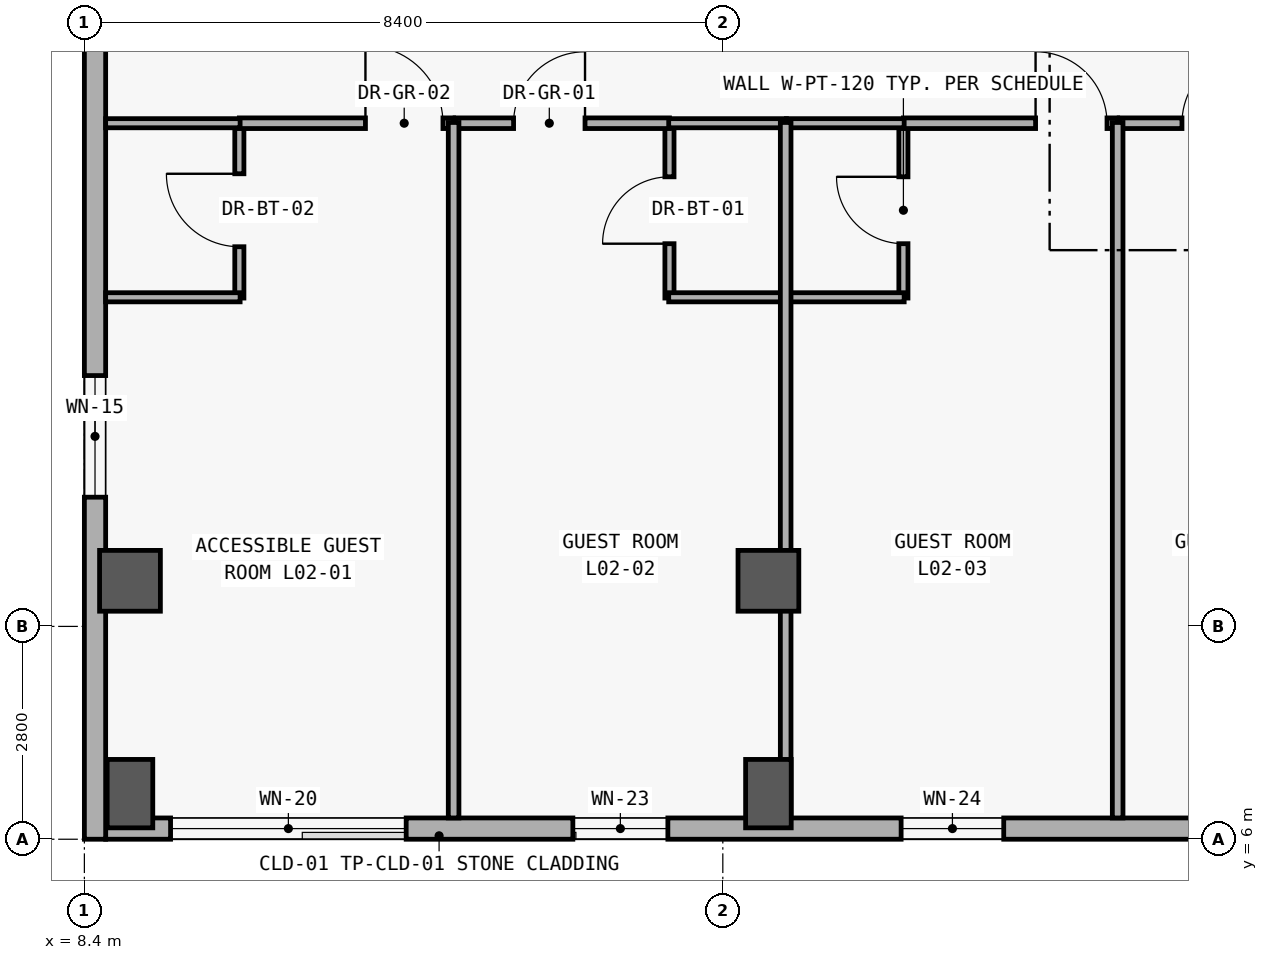
"""IFC4 building model, lengths in metres.
Left out: names, types, materials, properties, quantities, classifications, styles, units other than length and angle.
Written with IfcOpenShell. Run it as: python <this file> out.ifc"""

import sys

from ifc_helpers import new_model, si_unit, direction, frame, frame_2d, origin, origin_2d, place, context, subcontext, project, spatial, rectangle, extrude, element, fill, save


model = new_model("IFC4")
c1 = context("Model", 3, precision=1e-05, world=origin(), true_north=direction((0.0, 1.0)))
c2 = subcontext(c1, "Body", "Model", "MODEL_VIEW")
j1 = project(units=[si_unit("LENGTHUNIT", "METRE"), si_unit("PLANEANGLEUNIT", "RADIAN")], contexts=[c1])
p1 = place(None, origin())
s1 = spatial("IfcSite", under=j1, at=p1, CompositionType="ELEMENT")
p2 = place(p1, origin())
s2 = spatial("IfcBuilding", under=s1, at=p2, CompositionType="ELEMENT")
p3 = place(p2, frame((0.0, 0.0, 10.8)))
s3 = spatial("IfcBuildingStorey", under=s2, at=p3, CompositionType="ELEMENT", Elevation=10.8)
p4 = place(p3, frame((9.0, 6.6, 0.0), z_axis=(0.0, 0.0, 1.0), x_axis=(0.0, 1.0, 0.0)))
e1 = element("IfcColumn", 1, at=p4, inside=s3, PredefinedType="COLUMN", context=c2, shape_type="SweptSolid", body=[
    extrude(rectangle(XDim=0.6, YDim=0.9, at=origin_2d()), origin(), (0.0, 0.0, 1.0), 4.2),
])
p5 = place(p3, frame((9.0, 9.4, 0.0), z_axis=(0.0, 0.0, 1.0), x_axis=(1.0, 0.0, 0.0)))
e2 = element("IfcColumn", 2, at=p5, inside=s3, PredefinedType="COLUMN", context=c2, shape_type="SweptSolid", body=[
    extrude(rectangle(XDim=0.8, YDim=0.8, at=origin_2d()), origin(), (0.0, 0.0, 1.0), 4.2),
])
p6 = place(p3, frame((17.4, 6.6, 0.0), z_axis=(0.0, 0.0, 1.0), x_axis=(0.0, 1.0, 0.0)))
e3 = element("IfcColumn", 3, at=p6, inside=s3, PredefinedType="COLUMN", context=c2, shape_type="SweptSolid", body=[
    extrude(rectangle(XDim=0.6, YDim=0.9, at=origin_2d()), origin(), (0.0, 0.0, 1.0), 4.2),
])
p7 = place(p3, frame((17.4, 9.4, 0.0), z_axis=(0.0, 0.0, 1.0), x_axis=(1.0, 0.0, 0.0)))
e4 = element("IfcColumn", 4, at=p7, inside=s3, PredefinedType="COLUMN", context=c2, shape_type="SweptSolid", body=[
    extrude(rectangle(XDim=0.8, YDim=0.8, at=origin_2d()), origin(), (0.0, 0.0, 1.0), 4.2),
])
p8 = place(p3, frame((92.12, 6.14, 0.0), z_axis=(0.0, 0.0, 1.0), x_axis=(-1.0, 0.0, 0.0)))
e5 = element("IfcWall", 5, at=p8, inside=s3, PredefinedType="SOLIDWALL", context=c2, shape_type="SweptSolid", body=[
    extrude(rectangle(XDim=83.44, YDim=0.28, at=frame_2d((41.72, 0.0))), origin(), (0.0, 0.0, 1.0), 3.92),
])
p9 = place(p8, frame((79.486, 0.0, 0.85)))
e6 = element("IfcOpeningElement", 6, at=p9, cuts=e5, PredefinedType="OPENING", context=c2, shape_type="SweptSolid", body=[
    extrude(rectangle(XDim=3.1, YDim=2.2, at=frame_2d((1.55, 1.1))), frame((0.0, 0.15, 0.0), z_axis=(0.0, -1.0, 0.0), x_axis=(1.0, 0.0, 0.0)), (0.0, 0.0, 1.0), 0.3),
])
p10 = place(p8, frame((76.043, 0.0, 0.85)))
e7 = element("IfcOpeningElement", 7, at=p10, cuts=e5, PredefinedType="OPENING", context=c2, shape_type="SweptSolid", body=[
    extrude(rectangle(XDim=1.25, YDim=1.45, at=frame_2d((0.625, 0.725))), frame((0.0, 0.15, 0.0), z_axis=(0.0, -1.0, 0.0), x_axis=(1.0, 0.0, 0.0)), (0.0, 0.0, 1.0), 0.3),
])
p11 = place(p8, frame((71.624, 0.0, 0.85)))
e8 = element("IfcOpeningElement", 8, at=p11, cuts=e5, PredefinedType="OPENING", context=c2, shape_type="SweptSolid", body=[
    extrude(rectangle(XDim=1.35, YDim=1.55, at=frame_2d((0.675, 0.775))), frame((0.0, 0.15, 0.0), z_axis=(0.0, -1.0, 0.0), x_axis=(1.0, 0.0, 0.0)), (0.0, 0.0, 1.0), 0.3),
])
p12 = place(p8, frame((67.206, 0.0, 0.85)))
e9 = element("IfcOpeningElement", 9, at=p12, cuts=e5, PredefinedType="OPENING", context=c2, shape_type="SweptSolid", body=[
    extrude(rectangle(XDim=1.45, YDim=1.65, at=frame_2d((0.725, 0.825))), frame((0.0, 0.15, 0.0), z_axis=(0.0, -1.0, 0.0), x_axis=(1.0, 0.0, 0.0)), (0.0, 0.0, 1.0), 0.3),
])
p13 = place(p8, frame((62.787, 0.0, 0.85)))
e10 = element("IfcOpeningElement", 10, at=p13, cuts=e5, PredefinedType="OPENING", context=c2, shape_type="SweptSolid", body=[
    extrude(rectangle(XDim=1.55, YDim=1.65, at=frame_2d((0.775, 0.825))), frame((0.0, 0.15, 0.0), z_axis=(0.0, -1.0, 0.0), x_axis=(1.0, 0.0, 0.0)), (0.0, 0.0, 1.0), 0.3),
])
p14 = place(p8, frame((58.344, 0.0, 0.85)))
e11 = element("IfcOpeningElement", 11, at=p14, cuts=e5, PredefinedType="OPENING", context=c2, shape_type="SweptSolid", body=[
    extrude(rectangle(XDim=1.7, YDim=2.0, at=frame_2d((0.85, 1.0))), frame((0.0, 0.15, 0.0), z_axis=(0.0, -1.0, 0.0), x_axis=(1.0, 0.0, 0.0)), (0.0, 0.0, 1.0), 0.3),
])
p15 = place(p8, frame((53.675, 0.0, 0.85)))
e12 = element("IfcOpeningElement", 12, at=p15, cuts=e5, PredefinedType="OPENING", context=c2, shape_type="SweptSolid", body=[
    extrude(rectangle(XDim=2.3, YDim=2.05, at=frame_2d((1.15, 1.025))), frame((0.0, 0.15, 0.0), z_axis=(0.0, -1.0, 0.0), x_axis=(1.0, 0.0, 0.0)), (0.0, 0.0, 1.0), 0.3),
])
p16 = place(p8, frame((49.082, 0.0, 0.85)))
e13 = element("IfcOpeningElement", 13, at=p16, cuts=e5, PredefinedType="OPENING", context=c2, shape_type="SweptSolid", body=[
    extrude(rectangle(XDim=2.75, YDim=2.1, at=frame_2d((1.375, 1.05))), frame((0.0, 0.15, 0.0), z_axis=(0.0, -1.0, 0.0), x_axis=(1.0, 0.0, 0.0)), (0.0, 0.0, 1.0), 0.3),
])
p17 = place(p8, frame((44.439, 0.0, 0.85)))
e14 = element("IfcOpeningElement", 14, at=p17, cuts=e5, PredefinedType="OPENING", context=c2, shape_type="SweptSolid", body=[
    extrude(rectangle(XDim=3.3, YDim=2.15, at=frame_2d((1.65, 1.075))), frame((0.0, 0.15, 0.0), z_axis=(0.0, -1.0, 0.0), x_axis=(1.0, 0.0, 0.0)), (0.0, 0.0, 1.0), 0.3),
])
p18 = place(p8, frame((41.13, 0.0, 0.85)))
e15 = element("IfcOpeningElement", 15, at=p18, cuts=e5, PredefinedType="OPENING", context=c2, shape_type="SweptSolid", body=[
    extrude(rectangle(XDim=1.18, YDim=1.5, at=frame_2d((0.59, 0.75))), frame((0.0, 0.15, 0.0), z_axis=(0.0, -1.0, 0.0), x_axis=(1.0, 0.0, 0.0)), (0.0, 0.0, 1.0), 0.3),
])
p19 = place(p8, frame((36.712, 0.0, 0.85)))
e16 = element("IfcOpeningElement", 16, at=p19, cuts=e5, PredefinedType="OPENING", context=c2, shape_type="SweptSolid", body=[
    extrude(rectangle(XDim=1.28, YDim=1.6, at=frame_2d((0.64, 0.8))), frame((0.0, 0.15, 0.0), z_axis=(0.0, -1.0, 0.0), x_axis=(1.0, 0.0, 0.0)), (0.0, 0.0, 1.0), 0.3),
])
p20 = place(p8, frame((32.293, 0.0, 0.85)))
e17 = element("IfcOpeningElement", 17, at=p20, cuts=e5, PredefinedType="OPENING", context=c2, shape_type="SweptSolid", body=[
    extrude(rectangle(XDim=1.38, YDim=1.7, at=frame_2d((0.69, 0.85))), frame((0.0, 0.15, 0.0), z_axis=(0.0, -1.0, 0.0), x_axis=(1.0, 0.0, 0.0)), (0.0, 0.0, 1.0), 0.3),
])
p21 = place(p8, frame((27.875, 0.0, 0.85)))
e18 = element("IfcOpeningElement", 18, at=p21, cuts=e5, PredefinedType="OPENING", context=c2, shape_type="SweptSolid", body=[
    extrude(rectangle(XDim=1.48, YDim=1.8, at=frame_2d((0.74, 0.9))), frame((0.0, 0.15, 0.0), z_axis=(0.0, -1.0, 0.0), x_axis=(1.0, 0.0, 0.0)), (0.0, 0.0, 1.0), 0.3),
])
p22 = place(p8, frame((23.456, 0.0, 0.85)))
e19 = element("IfcOpeningElement", 19, at=p22, cuts=e5, PredefinedType="OPENING", context=c2, shape_type="SweptSolid", body=[
    extrude(rectangle(XDim=1.58, YDim=1.85, at=frame_2d((0.79, 0.925))), frame((0.0, 0.15, 0.0), z_axis=(0.0, -1.0, 0.0), x_axis=(1.0, 0.0, 0.0)), (0.0, 0.0, 1.0), 0.3),
])
p23 = place(p8, frame((19.038, 0.0, 0.85)))
e20 = element("IfcOpeningElement", 20, at=p23, cuts=e5, PredefinedType="OPENING", context=c2, shape_type="SweptSolid", body=[
    extrude(rectangle(XDim=1.68, YDim=1.9, at=frame_2d((0.84, 0.95))), frame((0.0, 0.15, 0.0), z_axis=(0.0, -1.0, 0.0), x_axis=(1.0, 0.0, 0.0)), (0.0, 0.0, 1.0), 0.3),
])
p24 = place(p8, frame((14.62, 0.0, 0.85)))
e21 = element("IfcOpeningElement", 21, at=p24, cuts=e5, PredefinedType="OPENING", context=c2, shape_type="SweptSolid", body=[
    extrude(rectangle(XDim=1.78, YDim=1.95, at=frame_2d((0.89, 0.975))), frame((0.0, 0.15, 0.0), z_axis=(0.0, -1.0, 0.0), x_axis=(1.0, 0.0, 0.0)), (0.0, 0.0, 1.0), 0.3),
])
p25 = place(p8, frame((10.201, 0.0, 0.85)))
e22 = element("IfcOpeningElement", 22, at=p25, cuts=e5, PredefinedType="OPENING", context=c2, shape_type="SweptSolid", body=[
    extrude(rectangle(XDim=1.88, YDim=1.95, at=frame_2d((0.94, 0.975))), frame((0.0, 0.15, 0.0), z_axis=(0.0, -1.0, 0.0), x_axis=(1.0, 0.0, 0.0)), (0.0, 0.0, 1.0), 0.3),
])
p26 = place(p8, frame((5.748, 0.0, 0.85)))
e23 = element("IfcOpeningElement", 23, at=p26, cuts=e5, PredefinedType="OPENING", context=c2, shape_type="SweptSolid", body=[
    extrude(rectangle(XDim=2.05, YDim=1.95, at=frame_2d((1.025, 0.975))), frame((0.0, 0.15, 0.0), z_axis=(0.0, -1.0, 0.0), x_axis=(1.0, 0.0, 0.0)), (0.0, 0.0, 1.0), 0.3),
])
p27 = place(p8, frame((1.314, 0.0, 0.85)))
e24 = element("IfcOpeningElement", 24, at=p27, cuts=e5, PredefinedType="OPENING", context=c2, shape_type="SweptSolid", body=[
    extrude(rectangle(XDim=2.18, YDim=1.95, at=frame_2d((1.09, 0.975))), frame((0.0, 0.15, 0.0), z_axis=(0.0, -1.0, 0.0), x_axis=(1.0, 0.0, 0.0)), (0.0, 0.0, 1.0), 0.3),
])
p28 = place(p3, frame((8.54, 6.0, 0.0), z_axis=(0.0, 0.0, 1.0), x_axis=(0.0, 1.0, 0.0)))
e25 = element("IfcWall", 25, at=p28, inside=s3, PredefinedType="SOLIDWALL", context=c2, shape_type="SweptSolid", body=[
    extrude(rectangle(XDim=28.0, YDim=0.28, at=frame_2d((14.0, 0.0))), origin(), (0.0, 0.0, 1.0), 3.92),
])
p29 = place(p28, frame((4.5, 0.0, 0.95)))
e26 = element("IfcOpeningElement", 26, at=p29, cuts=e25, PredefinedType="OPENING", context=c2, shape_type="SweptSolid", body=[
    extrude(rectangle(XDim=1.6, YDim=1.6, at=frame_2d((0.8, 0.8))), frame((0.0, 0.15, 0.0), z_axis=(0.0, -1.0, 0.0), x_axis=(1.0, 0.0, 0.0)), (0.0, 0.0, 1.0), 0.3),
])
p30 = place(p3, frame((10.439, 13.12, 0.0), z_axis=(0.0, 0.0, 1.0), x_axis=(0.0, 1.0, 0.0)))
e27 = element("IfcWall", 27, at=p30, inside=s3, PredefinedType="PARTITIONING", context=c2, shape_type="SweptSolid", body=[
    extrude(rectangle(XDim=2.31, YDim=0.12, at=frame_2d((1.155, 0.0))), origin(), (0.0, 0.0, 1.0), 3.02),
])
p31 = place(p30, frame((0.675, 0.0, 0.0)))
e28 = element("IfcOpeningElement", 28, at=p31, cuts=e27, PredefinedType="OPENING", context=c2, shape_type="SweptSolid", body=[
    extrude(rectangle(XDim=0.96, YDim=2.15, at=frame_2d((0.48, 1.075))), frame((0.0, 0.07, 0.0), z_axis=(0.0, -1.0, 0.0), x_axis=(1.0, 0.0, 0.0)), (0.0, 0.0, 1.0), 0.14),
])
p32 = place(p3, frame((16.098, 13.12, 0.0), z_axis=(0.0, 0.0, 1.0), x_axis=(0.0, 1.0, 0.0)))
e29 = element("IfcWall", 29, at=p32, inside=s3, PredefinedType="PARTITIONING", context=c2, shape_type="SweptSolid", body=[
    extrude(rectangle(XDim=2.31, YDim=0.12, at=frame_2d((1.155, 0.0))), origin(), (0.0, 0.0, 1.0), 3.02),
])
p33 = place(p32, frame((0.715, 0.0, 0.0)))
e30 = element("IfcOpeningElement", 30, at=p33, cuts=e29, PredefinedType="OPENING", context=c2, shape_type="SweptSolid", body=[
    extrude(rectangle(XDim=0.88, YDim=2.15, at=frame_2d((0.44, 1.075))), frame((0.0, 0.07, 0.0), z_axis=(0.0, -1.0, 0.0), x_axis=(1.0, 0.0, 0.0)), (0.0, 0.0, 1.0), 0.14),
])
p34 = place(p3, frame((19.176, 13.12, 0.0), z_axis=(0.0, 0.0, 1.0), x_axis=(0.0, 1.0, 0.0)))
e31 = element("IfcWall", 31, at=p34, inside=s3, PredefinedType="PARTITIONING", context=c2, shape_type="SweptSolid", body=[
    extrude(rectangle(XDim=2.31, YDim=0.12, at=frame_2d((1.155, 0.0))), origin(), (0.0, 0.0, 1.0), 3.02),
])
p35 = place(p34, frame((0.715, 0.0, 0.0)))
e32 = element("IfcOpeningElement", 32, at=p35, cuts=e31, PredefinedType="OPENING", context=c2, shape_type="SweptSolid", body=[
    extrude(rectangle(XDim=0.88, YDim=2.15, at=frame_2d((0.44, 1.075))), frame((0.0, 0.07, 0.0), z_axis=(0.0, -1.0, 0.0), x_axis=(1.0, 0.0, 0.0)), (0.0, 0.0, 1.0), 0.14),
])
p36 = place(p3, frame((10.439, 15.42, 0.0), z_axis=(0.0, 0.0, 1.0), x_axis=(1.0, 0.0, 0.0)))
e33 = element("IfcWall", 33, at=p36, inside=s3, PredefinedType="PARTITIONING", context=c2, shape_type="SweptSolid", body=[
    extrude(rectangle(XDim=2.819, YDim=0.14, at=frame_2d((1.41, 0.0))), origin(), (0.0, 0.0, 1.0), 3.02),
])
p37 = place(p36, frame((1.659, 0.0, 0.0)))
e34 = element("IfcOpeningElement", 34, at=p37, cuts=e33, PredefinedType="OPENING", context=c2, shape_type="SweptSolid", body=[
    extrude(rectangle(XDim=1.02, YDim=2.2, at=frame_2d((0.51, 1.1))), frame((0.0, 0.08, 0.0), z_axis=(0.0, -1.0, 0.0), x_axis=(1.0, 0.0, 0.0)), (0.0, 0.0, 1.0), 0.16),
])
p38 = place(p3, frame((13.278, 15.42, 0.0), z_axis=(0.0, 0.0, 1.0), x_axis=(1.0, 0.0, 0.0)))
e35 = element("IfcWall", 35, at=p38, inside=s3, PredefinedType="PARTITIONING", context=c2, shape_type="SweptSolid", body=[
    extrude(rectangle(XDim=2.82, YDim=0.14, at=frame_2d((1.41, 0.0))), origin(), (0.0, 0.0, 1.0), 3.02),
])
p39 = place(p38, frame((0.769, 0.0, 0.0)))
e36 = element("IfcOpeningElement", 36, at=p39, cuts=e35, PredefinedType="OPENING", context=c2, shape_type="SweptSolid", body=[
    extrude(rectangle(XDim=0.94, YDim=2.2, at=frame_2d((0.47, 1.1))), frame((0.0, 0.08, 0.0), z_axis=(0.0, -1.0, 0.0), x_axis=(1.0, 0.0, 0.0)), (0.0, 0.0, 1.0), 0.16),
])
p40 = place(p3, frame((19.176, 15.42, 0.0), z_axis=(0.0, 0.0, 1.0), x_axis=(1.0, 0.0, 0.0)))
e37 = element("IfcWall", 37, at=p40, inside=s3, PredefinedType="PARTITIONING", context=c2, shape_type="SweptSolid", body=[
    extrude(rectangle(XDim=2.819, YDim=0.14, at=frame_2d((1.41, 0.0))), origin(), (0.0, 0.0, 1.0), 3.02),
])
p41 = place(p40, frame((1.739, 0.0, 0.0)))
e38 = element("IfcOpeningElement", 38, at=p41, cuts=e37, PredefinedType="OPENING", context=c2, shape_type="SweptSolid", body=[
    extrude(rectangle(XDim=0.94, YDim=2.2, at=frame_2d((0.47, 1.1))), frame((0.0, 0.08, 0.0), z_axis=(0.0, -1.0, 0.0), x_axis=(1.0, 0.0, 0.0)), (0.0, 0.0, 1.0), 0.16),
])
p42 = place(p3, frame((22.015, 15.42, 0.0), z_axis=(0.0, 0.0, 1.0), x_axis=(1.0, 0.0, 0.0)))
e39 = element("IfcWall", 39, at=p42, inside=s3, PredefinedType="PARTITIONING", context=c2, shape_type="SweptSolid", body=[
    extrude(rectangle(XDim=2.82, YDim=0.14, at=frame_2d((1.41, 0.0))), origin(), (0.0, 0.0, 1.0), 3.02),
])
p43 = place(p42, frame((0.826, 0.0, 0.0)))
e40 = element("IfcOpeningElement", 40, at=p43, cuts=e39, PredefinedType="OPENING", context=c2, shape_type="SweptSolid", body=[
    extrude(rectangle(XDim=0.94, YDim=2.2, at=frame_2d((0.47, 1.1))), frame((0.0, 0.08, 0.0), z_axis=(0.0, -1.0, 0.0), x_axis=(1.0, 0.0, 0.0)), (0.0, 0.0, 1.0), 0.16),
])
for number, where, z_axis, x_axis in (
    (41, (8.68, 13.13, 0.0), (0.0, 0.0, 1.0), (1.0, 0.0, 0.0)),
    (42, (8.68, 15.42, 0.0), (0.0, 0.0, 1.0), (1.0, 0.0, 0.0)),
):
    element("IfcWall", number, at=place(p3, frame(where, z_axis=z_axis, x_axis=x_axis)), inside=s3, PredefinedType="PARTITIONING", context=c2, shape_type="SweptSolid", body=[
        extrude(rectangle(XDim=1.769, YDim=0.12, at=frame_2d((0.885, 0.0))), origin(), (0.0, 0.0, 1.0), 3.02),
    ])
for number, where, z_axis, x_axis in (
    (43, (16.088, 13.13, 0.0), (0.0, 0.0, 1.0), (1.0, 0.0, 0.0)),
    (44, (16.088, 15.42, 0.0), (0.0, 0.0, 1.0), (1.0, 0.0, 0.0)),
    (45, (17.637, 13.13, 0.0), (0.0, 0.0, 1.0), (1.0, 0.0, 0.0)),
    (46, (17.637, 15.42, 0.0), (0.0, 0.0, 1.0), (1.0, 0.0, 0.0)),
):
    element("IfcWall", number, at=place(p3, frame(where, z_axis=z_axis, x_axis=x_axis)), inside=s3, PredefinedType="PARTITIONING", context=c2, shape_type="SweptSolid", body=[
        extrude(rectangle(XDim=1.549, YDim=0.12, at=frame_2d((0.774, 0.0))), origin(), (0.0, 0.0, 1.0), 3.02),
    ])
for number, where, z_axis, x_axis in (
    (47, (13.258, 6.28, 0.0), (0.0, 0.0, 1.0), (0.0, 1.0, 0.0)),
    (48, (17.627, 6.28, 0.0), (0.0, 0.0, 1.0), (0.0, 1.0, 0.0)),
    (49, (21.995, 6.28, 0.0), (0.0, 0.0, 1.0), (0.0, 1.0, 0.0)),
):
    element("IfcWall", number, at=place(p3, frame(where, z_axis=z_axis, x_axis=x_axis)), inside=s3, PredefinedType="PARTITIONING", context=c2, shape_type="SweptSolid", body=[
        extrude(rectangle(XDim=9.15, YDim=0.14, at=frame_2d((4.575, 0.0))), origin(), (0.0, 0.0, 1.0), 3.02),
    ])
p44 = place(p9, origin())
e50 = element("IfcWindow", 50, at=p44, inside=s3, PartitioningType="SINGLE_PANEL", PredefinedType="WINDOW", context=c2, shape_type="SweptSolid", body=[
    extrude(rectangle(XDim=3.1, YDim=2.2, at=frame_2d((1.55, 1.1))), frame((0.0, 0.03, 0.0), z_axis=(0.0, -1.0, 0.0), x_axis=(1.0, 0.0, 0.0)), (0.0, 0.0, 1.0), 0.06),
])
fill(e6, e50)
p45 = place(p10, origin())
e51 = element("IfcWindow", 51, at=p45, inside=s3, PartitioningType="SINGLE_PANEL", PredefinedType="WINDOW", context=c2, shape_type="SweptSolid", body=[
    extrude(rectangle(XDim=1.25, YDim=1.45, at=frame_2d((0.625, 0.725))), frame((0.0, 0.03, 0.0), z_axis=(0.0, -1.0, 0.0), x_axis=(1.0, 0.0, 0.0)), (0.0, 0.0, 1.0), 0.06),
])
fill(e7, e51)
p46 = place(p11, origin())
e52 = element("IfcWindow", 52, at=p46, inside=s3, PartitioningType="SINGLE_PANEL", PredefinedType="WINDOW", context=c2, shape_type="SweptSolid", body=[
    extrude(rectangle(XDim=1.35, YDim=1.55, at=frame_2d((0.675, 0.775))), frame((0.0, 0.03, 0.0), z_axis=(0.0, -1.0, 0.0), x_axis=(1.0, 0.0, 0.0)), (0.0, 0.0, 1.0), 0.06),
])
fill(e8, e52)
p47 = place(p29, origin())
e53 = element("IfcWindow", 53, at=p47, inside=s3, PartitioningType="SINGLE_PANEL", PredefinedType="WINDOW", context=c2, shape_type="SweptSolid", body=[
    extrude(rectangle(XDim=1.6, YDim=1.6, at=frame_2d((0.8, 0.8))), frame((0.0, 0.03, 0.0), z_axis=(0.0, -1.0, 0.0), x_axis=(1.0, 0.0, 0.0)), (0.0, 0.0, 1.0), 0.06),
])
fill(e26, e53)
p48 = place(p31, origin())
e54 = element("IfcDoor", 54, at=p48, inside=s3, OperationType="SINGLE_SWING_RIGHT", PredefinedType="DOOR", context=c2, shape_type="SweptSolid", body=[
    extrude(rectangle(XDim=0.96, YDim=2.15, at=frame_2d((0.48, 1.075))), frame((0.0, 0.025, 0.0), z_axis=(0.0, -1.0, 0.0), x_axis=(1.0, 0.0, 0.0)), (0.0, 0.0, 1.0), 0.05),
])
fill(e28, e54)
p49 = place(p33, origin())
e55 = element("IfcDoor", 55, at=p49, inside=s3, OperationType="SINGLE_SWING_LEFT", PredefinedType="DOOR", context=c2, shape_type="SweptSolid", body=[
    extrude(rectangle(XDim=0.88, YDim=2.15, at=frame_2d((0.44, 1.075))), frame((0.0, 0.025, 0.0), z_axis=(0.0, -1.0, 0.0), x_axis=(1.0, 0.0, 0.0)), (0.0, 0.0, 1.0), 0.05),
])
fill(e30, e55)
p50 = place(p35, origin())
e56 = element("IfcDoor", 56, at=p50, inside=s3, OperationType="SINGLE_SWING_RIGHT", PredefinedType="DOOR", context=c2, shape_type="SweptSolid", body=[
    extrude(rectangle(XDim=0.88, YDim=2.15, at=frame_2d((0.44, 1.075))), frame((0.0, 0.025, 0.0), z_axis=(0.0, -1.0, 0.0), x_axis=(1.0, 0.0, 0.0)), (0.0, 0.0, 1.0), 0.05),
])
fill(e32, e56)
p51 = place(p37, origin())
e57 = element("IfcDoor", 57, at=p51, inside=s3, OperationType="SINGLE_SWING_LEFT", PredefinedType="DOOR", context=c2, shape_type="SweptSolid", body=[
    extrude(rectangle(XDim=1.02, YDim=2.2, at=frame_2d((0.51, 1.1))), frame((0.0, 0.025, 0.0), z_axis=(0.0, -1.0, 0.0), x_axis=(1.0, 0.0, 0.0)), (0.0, 0.0, 1.0), 0.05),
])
fill(e34, e57)
p52 = place(p39, origin())
e58 = element("IfcDoor", 58, at=p52, inside=s3, OperationType="SINGLE_SWING_RIGHT", PredefinedType="DOOR", context=c2, shape_type="SweptSolid", body=[
    extrude(rectangle(XDim=0.94, YDim=2.2, at=frame_2d((0.47, 1.1))), frame((0.0, 0.025, 0.0), z_axis=(0.0, -1.0, 0.0), x_axis=(1.0, 0.0, 0.0)), (0.0, 0.0, 1.0), 0.05),
])
fill(e36, e58)
p53 = place(p41, origin())
e59 = element("IfcDoor", 59, at=p53, inside=s3, OperationType="SINGLE_SWING_LEFT", PredefinedType="DOOR", context=c2, shape_type="SweptSolid", body=[
    extrude(rectangle(XDim=0.94, YDim=2.2, at=frame_2d((0.47, 1.1))), frame((0.0, 0.025, 0.0), z_axis=(0.0, -1.0, 0.0), x_axis=(1.0, 0.0, 0.0)), (0.0, 0.0, 1.0), 0.05),
])
fill(e38, e59)
p54 = place(p43, origin())
e60 = element("IfcDoor", 60, at=p54, inside=s3, OperationType="SINGLE_SWING_RIGHT", PredefinedType="DOOR", context=c2, shape_type="SweptSolid", body=[
    extrude(rectangle(XDim=0.94, YDim=2.2, at=frame_2d((0.47, 1.1))), frame((0.0, 0.025, 0.0), z_axis=(0.0, -1.0, 0.0), x_axis=(1.0, 0.0, 0.0)), (0.0, 0.0, 1.0), 0.05),
])
fill(e40, e60)
save(model, sys.argv[1])
